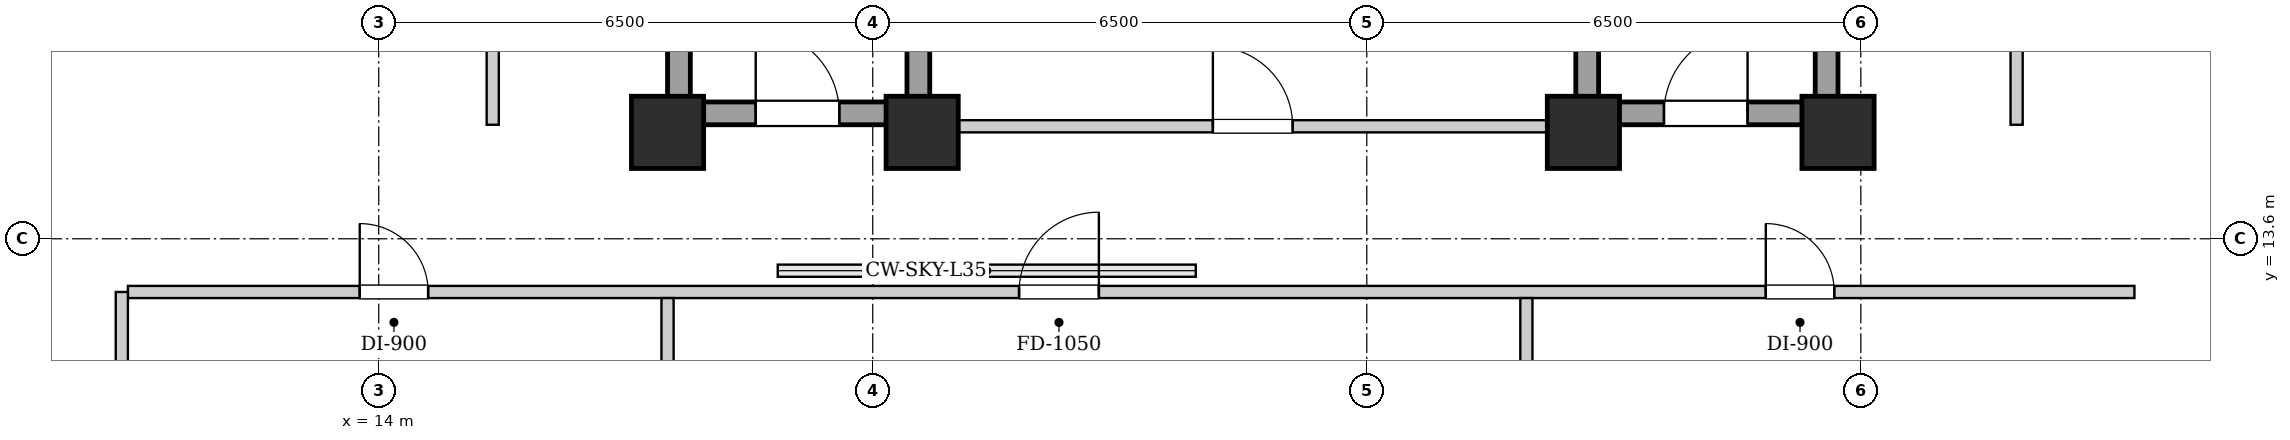
"""IFC4 building model, lengths in metres.
Left out: names, types, materials, properties, quantities, classifications, styles, units other than length and angle.
Written with IfcOpenShell. Run it as: python <this file> out.ifc"""

import sys

from ifc_helpers import new_model, si_unit, direction, frame, frame_2d, origin, origin_2d, place, context, subcontext, project, spatial, rectangle, extrude, element, fill, save


model = new_model("IFC4")
c1 = context("Model", 3, precision=1e-05, world=origin(), true_north=direction((0.0, 1.0)))
c2 = subcontext(c1, "Body", "Model", "MODEL_VIEW")
j1 = project(units=[si_unit("LENGTHUNIT", "METRE"), si_unit("PLANEANGLEUNIT", "RADIAN")], contexts=[c1])
p1 = place(None, origin())
s1 = spatial("IfcSite", under=j1, at=p1, CompositionType="ELEMENT")
p2 = place(p1, origin())
s2 = spatial("IfcBuilding", under=s1, at=p2, CompositionType="ELEMENT")
p3 = place(p2, frame((0.0, 0.0, 124.4)))
s3 = spatial("IfcBuildingStorey", under=s2, at=p3, CompositionType="ELEMENT", Elevation=124.4)
for number, where, z_axis, x_axis in (
    (1, (17.8, 15.0, 0.0), (0.0, 0.0, 1.0), (1.0, 0.0, 0.0)),
    (2, (21.15, 15.0, 0.0), (0.0, 0.0, 1.0), (1.0, 0.0, 0.0)),
    (3, (29.85, 15.0, 0.0), (0.0, 0.0, 1.0), (1.0, 0.0, 0.0)),
    (4, (33.2, 15.0, 0.0), (0.0, 0.0, 1.0), (1.0, 0.0, 0.0)),
):
    element("IfcColumn", number, at=place(p3, frame(where, z_axis=z_axis, x_axis=x_axis)), inside=s3, PredefinedType="COLUMN", context=c2, shape_type="SweptSolid", body=[
        extrude(rectangle(XDim=0.95, YDim=0.95, at=origin_2d()), origin(), (0.0, 0.0, 1.0), 3.25),
    ])
for number, where, z_axis, x_axis in (
    (5, (17.95, 15.1, 0.0), (0.0, 0.0, 1.0), (0.0, 1.0, 0.0)),
    (6, (21.1, 15.1, 0.0), (0.0, 0.0, 1.0), (0.0, 1.0, 0.0)),
):
    element("IfcWall", number, at=place(p3, frame(where, z_axis=z_axis, x_axis=x_axis)), inside=s3, PredefinedType="SHEAR", context=c2, shape_type="SweptSolid", body=[
        extrude(rectangle(XDim=9.0, YDim=0.3, at=frame_2d((4.5, 0.0))), origin(), (0.0, 0.0, 1.0), 2.99),
    ])
p4 = place(p3, frame((18.1, 15.25, 0.0), z_axis=(0.0, 0.0, 1.0), x_axis=(1.0, 0.0, 0.0)))
e7 = element("IfcWall", 7, at=p4, inside=s3, PredefinedType="SHEAR", context=c2, shape_type="SweptSolid", body=[
    extrude(rectangle(XDim=2.85, YDim=0.3, at=frame_2d((1.425, 0.0))), origin(), (0.0, 0.0, 1.0), 2.99),
])
p5 = place(p4, frame((0.86, 0.0, 0.0)))
e8 = element("IfcOpeningElement", 8, at=p5, cuts=e7, PredefinedType="OPENING", context=c2, shape_type="SweptSolid", body=[
    extrude(rectangle(XDim=1.1, YDim=2.05, at=frame_2d((0.55, 1.025))), frame((0.0, 0.16, 0.0), z_axis=(0.0, -1.0, 0.0), x_axis=(1.0, 0.0, 0.0)), (0.0, 0.0, 1.0), 0.32),
])
for number, where, z_axis, x_axis in (
    (9, (29.9, 15.1, 0.0), (0.0, 0.0, 1.0), (0.0, 1.0, 0.0)),
    (10, (33.05, 15.1, 0.0), (0.0, 0.0, 1.0), (0.0, 1.0, 0.0)),
):
    element("IfcWall", number, at=place(p3, frame(where, z_axis=z_axis, x_axis=x_axis)), inside=s3, PredefinedType="SHEAR", context=c2, shape_type="SweptSolid", body=[
        extrude(rectangle(XDim=9.0, YDim=0.3, at=frame_2d((4.5, 0.0))), origin(), (0.0, 0.0, 1.0), 2.99),
    ])
p6 = place(p3, frame((30.05, 15.25, 0.0), z_axis=(0.0, 0.0, 1.0), x_axis=(1.0, 0.0, 0.0)))
e11 = element("IfcWall", 11, at=p6, inside=s3, PredefinedType="SHEAR", context=c2, shape_type="SweptSolid", body=[
    extrude(rectangle(XDim=2.85, YDim=0.3, at=frame_2d((1.425, 0.0))), origin(), (0.0, 0.0, 1.0), 2.99),
])
p7 = place(p6, frame((0.86, 0.0, 0.0)))
e12 = element("IfcOpeningElement", 12, at=p7, cuts=e11, PredefinedType="OPENING", context=c2, shape_type="SweptSolid", body=[
    extrude(rectangle(XDim=1.1, YDim=2.05, at=frame_2d((0.55, 1.025))), frame((0.0, 0.16, 0.0), z_axis=(0.0, -1.0, 0.0), x_axis=(1.0, 0.0, 0.0)), (0.0, 0.0, 1.0), 0.32),
])
p8 = place(p3, frame((21.25, 15.08, 0.0), z_axis=(0.0, 0.0, 1.0), x_axis=(1.0, 0.0, 0.0)))
e13 = element("IfcWall", 13, at=p8, inside=s3, PredefinedType="PARTITIONING", context=c2, shape_type="SweptSolid", body=[
    extrude(rectangle(XDim=8.5, YDim=0.16, at=frame_2d((4.25, 0.0))), origin(), (0.0, 0.0, 1.0), 2.426),
])
p9 = place(p8, frame((3.725, 0.0, 0.0)))
e14 = element("IfcOpeningElement", 14, at=p9, cuts=e13, PredefinedType="OPENING", context=c2, shape_type="SweptSolid", body=[
    extrude(rectangle(XDim=1.05, YDim=2.05, at=frame_2d((0.525, 1.025))), frame((0.0, 0.09, 0.0), z_axis=(0.0, -1.0, 0.0), x_axis=(1.0, 0.0, 0.0)), (0.0, 0.0, 1.0), 0.18),
])
p10 = place(p3, frame((10.7, 12.9, 0.0), z_axis=(0.0, 0.0, 1.0), x_axis=(1.0, 0.0, 0.0)))
e15 = element("IfcWall", 15, at=p10, inside=s3, PredefinedType="PARTITIONING", context=c2, shape_type="SweptSolid", body=[
    extrude(rectangle(XDim=26.4, YDim=0.16, at=frame_2d((13.2, 0.0))), origin(), (0.0, 0.0, 1.0), 2.99),
])
p11 = place(p10, frame((3.05, 0.0, 0.0)))
e16 = element("IfcOpeningElement", 16, at=p11, cuts=e15, PredefinedType="OPENING", context=c2, shape_type="SweptSolid", body=[
    extrude(rectangle(XDim=0.9, YDim=2.05, at=frame_2d((0.45, 1.025))), frame((0.0, 0.09, 0.0), z_axis=(0.0, -1.0, 0.0), x_axis=(1.0, 0.0, 0.0)), (0.0, 0.0, 1.0), 0.18),
])
p12 = place(p10, frame((11.725, 0.0, 0.0)))
e17 = element("IfcOpeningElement", 17, at=p12, cuts=e15, PredefinedType="OPENING", context=c2, shape_type="SweptSolid", body=[
    extrude(rectangle(XDim=1.05, YDim=2.05, at=frame_2d((0.525, 1.025))), frame((0.0, 0.09, 0.0), z_axis=(0.0, -1.0, 0.0), x_axis=(1.0, 0.0, 0.0)), (0.0, 0.0, 1.0), 0.18),
])
p13 = place(p10, frame((21.55, 0.0, 0.0)))
e18 = element("IfcOpeningElement", 18, at=p13, cuts=e15, PredefinedType="OPENING", context=c2, shape_type="SweptSolid", body=[
    extrude(rectangle(XDim=0.9, YDim=2.05, at=frame_2d((0.45, 1.025))), frame((0.0, 0.09, 0.0), z_axis=(0.0, -1.0, 0.0), x_axis=(1.0, 0.0, 0.0)), (0.0, 0.0, 1.0), 0.18),
])
p14 = place(p3, frame((17.8, 4.08, 0.0), z_axis=(0.0, 0.0, 1.0), x_axis=(0.0, 1.0, 0.0)))
e19 = element("IfcWall", 19, at=p14, inside=s3, PredefinedType="PARTITIONING", context=c2, shape_type="SweptSolid", body=[
    extrude(rectangle(XDim=8.74, YDim=0.16, at=frame_2d((4.37, 0.0))), origin(), (0.0, 0.0, 1.0), 2.426),
])
p15 = place(p3, frame((29.1, 4.08, 0.0), z_axis=(0.0, 0.0, 1.0), x_axis=(0.0, 1.0, 0.0)))
e20 = element("IfcWall", 20, at=p15, inside=s3, PredefinedType="PARTITIONING", context=c2, shape_type="SweptSolid", body=[
    extrude(rectangle(XDim=8.74, YDim=0.16, at=frame_2d((4.37, 0.0))), origin(), (0.0, 0.0, 1.0), 2.99),
])
p16 = place(p3, frame((10.62, 6.92, 0.0), z_axis=(0.0, 0.0, 1.0), x_axis=(0.0, 1.0, 0.0)))
e21 = element("IfcWall", 21, at=p16, inside=s3, PredefinedType="PARTITIONING", context=c2, shape_type="SweptSolid", body=[
    extrude(rectangle(XDim=5.98, YDim=0.16, at=frame_2d((2.99, 0.0))), origin(), (0.0, 0.0, 1.0), 2.99),
])
p17 = place(p3, frame((15.5, 15.1, 0.0), z_axis=(0.0, 0.0, 1.0), x_axis=(0.0, 1.0, 0.0)))
e22 = element("IfcWall", 22, at=p17, inside=s3, PredefinedType="PARTITIONING", context=c2, shape_type="SweptSolid", body=[
    extrude(rectangle(XDim=13.8, YDim=0.16, at=frame_2d((6.9, 0.0))), origin(), (0.0, 0.0, 1.0), 2.99),
])
p18 = place(p17, frame((6.475, 0.0, 0.0)))
e23 = element("IfcOpeningElement", 23, at=p18, cuts=e22, PredefinedType="OPENING", context=c2, shape_type="SweptSolid", body=[
    extrude(rectangle(XDim=1.05, YDim=2.05, at=frame_2d((0.525, 1.025))), frame((0.0, 0.09, 0.0), z_axis=(0.0, -1.0, 0.0), x_axis=(1.0, 0.0, 0.0)), (0.0, 0.0, 1.0), 0.18),
])
p19 = place(p3, frame((35.55, 15.1, 0.0), z_axis=(0.0, 0.0, 1.0), x_axis=(0.0, 1.0, 0.0)))
e24 = element("IfcWall", 24, at=p19, inside=s3, PredefinedType="PARTITIONING", context=c2, shape_type="SweptSolid", body=[
    extrude(rectangle(XDim=13.8, YDim=0.16, at=frame_2d((6.9, 0.0))), origin(), (0.0, 0.0, 1.0), 2.99),
])
p20 = place(p19, frame((6.475, 0.0, 0.0)))
e25 = element("IfcOpeningElement", 25, at=p20, cuts=e24, PredefinedType="OPENING", context=c2, shape_type="SweptSolid", body=[
    extrude(rectangle(XDim=1.05, YDim=2.05, at=frame_2d((0.525, 1.025))), frame((0.0, 0.09, 0.0), z_axis=(0.0, -1.0, 0.0), x_axis=(1.0, 0.0, 0.0)), (0.0, 0.0, 1.0), 0.18),
])
p21 = place(p5, origin())
e26 = element("IfcDoor", 26, at=p21, inside=s3, OperationType="SINGLE_SWING_LEFT", PredefinedType="DOOR", context=c2, shape_type="SweptSolid", body=[
    extrude(rectangle(XDim=1.1, YDim=2.05, at=frame_2d((0.55, 1.025))), frame((0.0, 0.025, 0.0), z_axis=(0.0, -1.0, 0.0), x_axis=(1.0, 0.0, 0.0)), (0.0, 0.0, 1.0), 0.05),
])
fill(e8, e26)
p22 = place(p7, origin())
e27 = element("IfcDoor", 27, at=p22, inside=s3, OperationType="SINGLE_SWING_RIGHT", PredefinedType="DOOR", context=c2, shape_type="SweptSolid", body=[
    extrude(rectangle(XDim=1.1, YDim=2.05, at=frame_2d((0.55, 1.025))), frame((0.0, 0.025, 0.0), z_axis=(0.0, -1.0, 0.0), x_axis=(1.0, 0.0, 0.0)), (0.0, 0.0, 1.0), 0.05),
])
fill(e12, e27)
p23 = place(p9, origin())
e28 = element("IfcDoor", 28, at=p23, inside=s3, OperationType="SINGLE_SWING_LEFT", PredefinedType="DOOR", context=c2, shape_type="SweptSolid", body=[
    extrude(rectangle(XDim=1.05, YDim=2.05, at=frame_2d((0.525, 1.025))), frame((0.0, 0.025, 0.0), z_axis=(0.0, -1.0, 0.0), x_axis=(1.0, 0.0, 0.0)), (0.0, 0.0, 1.0), 0.05),
])
fill(e14, e28)
p24 = place(p11, origin())
e29 = element("IfcDoor", 29, at=p24, inside=s3, OperationType="SINGLE_SWING_LEFT", PredefinedType="DOOR", context=c2, shape_type="SweptSolid", body=[
    extrude(rectangle(XDim=0.9, YDim=2.05, at=frame_2d((0.45, 1.025))), frame((0.0, 0.025, 0.0), z_axis=(0.0, -1.0, 0.0), x_axis=(1.0, 0.0, 0.0)), (0.0, 0.0, 1.0), 0.05),
])
fill(e16, e29)
p25 = place(p12, origin())
e30 = element("IfcDoor", 30, at=p25, inside=s3, OperationType="SINGLE_SWING_RIGHT", PredefinedType="DOOR", context=c2, shape_type="SweptSolid", body=[
    extrude(rectangle(XDim=1.05, YDim=2.05, at=frame_2d((0.525, 1.025))), frame((0.0, 0.025, 0.0), z_axis=(0.0, -1.0, 0.0), x_axis=(1.0, 0.0, 0.0)), (0.0, 0.0, 1.0), 0.05),
])
fill(e17, e30)
p26 = place(p13, origin())
e31 = element("IfcDoor", 31, at=p26, inside=s3, OperationType="SINGLE_SWING_LEFT", PredefinedType="DOOR", context=c2, shape_type="SweptSolid", body=[
    extrude(rectangle(XDim=0.9, YDim=2.05, at=frame_2d((0.45, 1.025))), frame((0.0, 0.025, 0.0), z_axis=(0.0, -1.0, 0.0), x_axis=(1.0, 0.0, 0.0)), (0.0, 0.0, 1.0), 0.05),
])
fill(e18, e31)
save(model, sys.argv[1])
